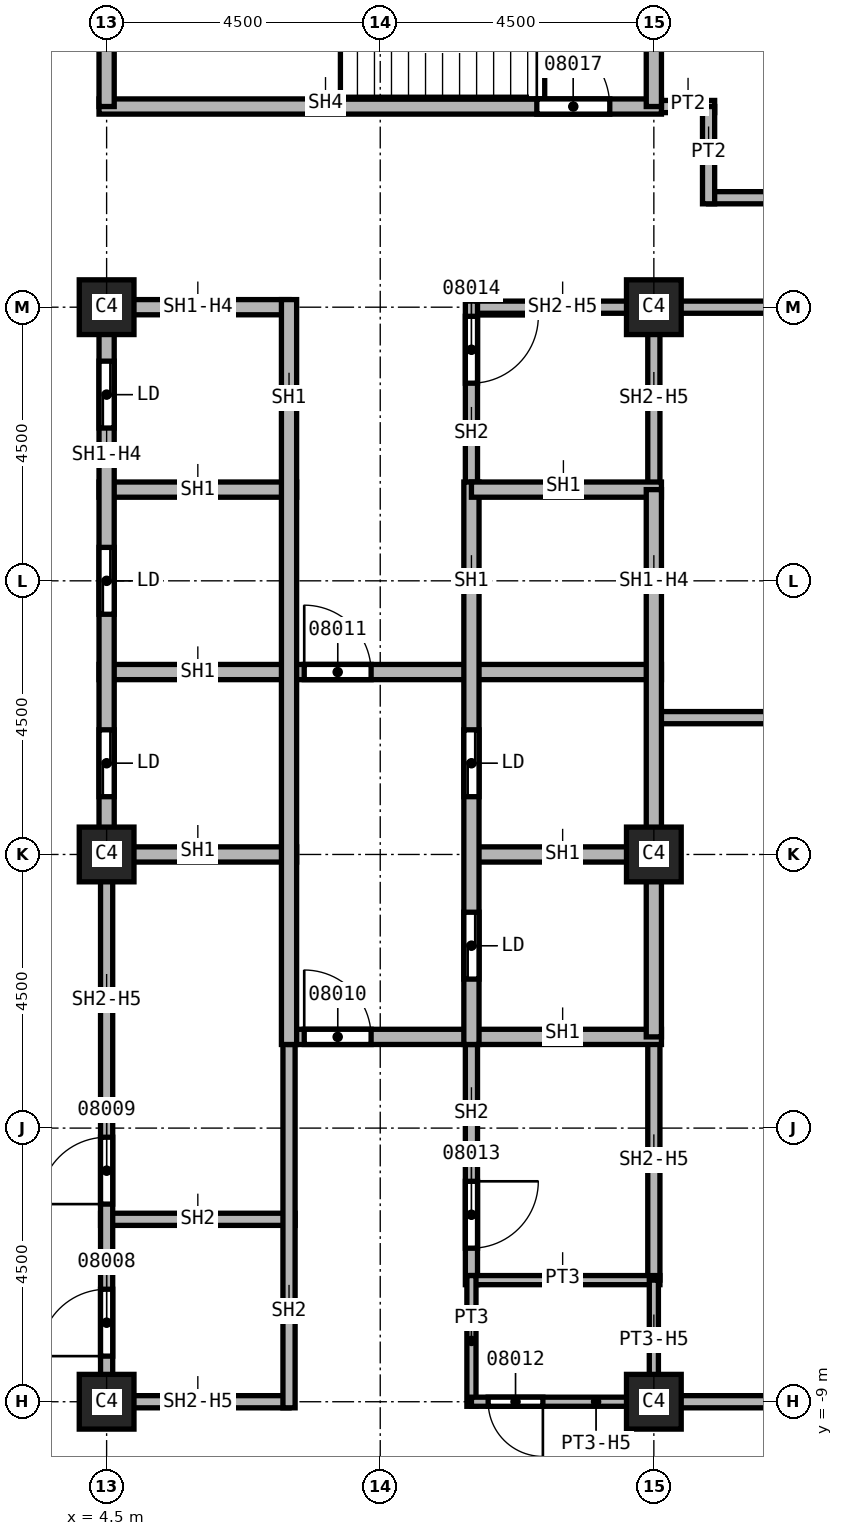
"""IFC4 building model, lengths in metres.
Left out: names, types, materials, properties, quantities, classifications, styles, units other than length and angle.
Written with IfcOpenShell. Run it as: python <this file> out.ifc"""

import sys

from ifc_helpers import new_model, si_unit, direction, frame, frame_2d, origin, origin_2d, place, context, subcontext, project, spatial, rectangle, extrude, element, fill, save


model = new_model("IFC4")
c1 = context("Model", 3, precision=1e-05, world=origin(), true_north=direction((0.0, 1.0)))
c2 = subcontext(c1, "Body", "Model", "MODEL_VIEW")
j1 = project(units=[si_unit("LENGTHUNIT", "METRE"), si_unit("PLANEANGLEUNIT", "RADIAN")], contexts=[c1])
p1 = place(None, origin())
s1 = spatial("IfcSite", under=j1, at=p1, CompositionType="ELEMENT")
p2 = place(p1, origin())
s2 = spatial("IfcBuilding", under=s1, at=p2, CompositionType="ELEMENT")
p3 = place(p2, frame((0.0, 0.0, 150.0)))
s3 = spatial("IfcBuildingStorey", under=s2, at=p3, CompositionType="ELEMENT", Elevation=150.0)
for number, where, z_axis, x_axis in (
    (1, (4.5, 0.0, 0.0), (0.0, 0.0, 1.0), (1.0, 0.0, 0.0)),
    (2, (4.5, 9.0, 0.0), (0.0, 0.0, 1.0), (1.0, 0.0, 0.0)),
    (3, (4.5, -9.0, 0.0), (0.0, 0.0, 1.0), (1.0, 0.0, 0.0)),
    (4, (13.5, 0.0, 0.0), (0.0, 0.0, 1.0), (1.0, 0.0, 0.0)),
    (5, (13.5, 9.0, 0.0), (0.0, 0.0, 1.0), (1.0, 0.0, 0.0)),
    (6, (13.5, -9.0, 0.0), (0.0, 0.0, 1.0), (1.0, 0.0, 0.0)),
):
    element("IfcColumn", number, at=place(p3, frame(where, z_axis=z_axis, x_axis=x_axis)), inside=s3, PredefinedType="COLUMN", context=c2, shape_type="SweptSolid", body=[
        extrude(rectangle(XDim=0.9, YDim=0.9, at=origin_2d()), origin(), (0.0, 0.0, 1.0), 3.7),
    ])
p4 = place(p3, frame((13.375, 12.3, 0.0), z_axis=(0.0, 0.0, 1.0), x_axis=(1.0, 0.0, 0.0)))
e7 = element("IfcWall", 7, at=p4, inside=s3, PredefinedType="PARTITIONING", context=c2, shape_type="SweptSolid", body=[
    extrude(rectangle(XDim=1.125, YDim=0.2, at=frame_2d((0.562, 0.0))), origin(), (0.0, 0.0, 1.0), 3.7),
])
for number, where, z_axis, x_axis in (
    (8, (13.5, -9.0, 0.0), (0.0, 0.0, 1.0), (1.0, 0.0, 0.0)),
    (9, (13.5, 2.25, 0.0), (0.0, 0.0, 1.0), (1.0, 0.0, 0.0)),
    (10, (18.0, 9.0, 0.0), (0.0, 0.0, 1.0), (-1.0, 0.0, 0.0)),
):
    element("IfcWall", number, at=place(p3, frame(where, z_axis=z_axis, x_axis=x_axis)), inside=s3, PredefinedType="PARTITIONING", context=c2, shape_type="SweptSolid", body=[
        extrude(rectangle(XDim=4.5, YDim=0.2, at=frame_2d((2.25, 0.0))), origin(), (0.0, 0.0, 1.0), 3.7),
    ])
p5 = place(p3, frame((14.4, 10.8, 0.0), z_axis=(0.0, 0.0, 1.0), x_axis=(1.0, 0.0, 0.0)))
e11 = element("IfcWall", 11, at=p5, inside=s3, PredefinedType="PARTITIONING", context=c2, shape_type="SweptSolid", body=[
    extrude(rectangle(XDim=3.6, YDim=0.2, at=frame_2d((1.8, 0.0))), origin(), (0.0, 0.0, 1.0), 3.7),
])
p6 = place(p3, frame((14.4, 12.3, 0.0), z_axis=(0.0, 0.0, 1.0), x_axis=(0.0, -1.0, 0.0)))
e12 = element("IfcWall", 12, at=p6, inside=s3, PredefinedType="PARTITIONING", context=c2, shape_type="SweptSolid", body=[
    extrude(rectangle(XDim=1.6, YDim=0.2, at=frame_2d((0.8, 0.0))), origin(), (0.0, 0.0, 1.0), 3.7),
])
p7 = place(p3, frame((4.4, -6.0, 0.0), z_axis=(0.0, 0.0, 1.0), x_axis=(1.0, 0.0, 0.0)))
e13 = element("IfcWall", 13, at=p7, inside=s3, PredefinedType="SOLIDWALL", context=c2, shape_type="SweptSolid", body=[
    extrude(rectangle(XDim=3.2, YDim=0.2, at=frame_2d((1.6, 0.0))), origin(), (0.0, 0.0, 1.0), 3.7),
])
p8 = place(p3, frame((4.5, -9.1, 0.0), z_axis=(0.0, 0.0, 1.0), x_axis=(0.0, 1.0, 0.0)))
e14 = element("IfcWall", 14, at=p8, inside=s3, PredefinedType="SOLIDWALL", context=c2, shape_type="SweptSolid", body=[
    extrude(rectangle(XDim=9.1, YDim=0.2, at=frame_2d((4.55, 0.0))), origin(), (0.0, 0.0, 1.0), 2.938),
])
p9 = place(p8, frame((0.85, 0.0, 0.0)))
e15 = element("IfcOpeningElement", 15, at=p9, cuts=e14, PredefinedType="OPENING", context=c2, shape_type="SweptSolid", body=[
    extrude(rectangle(XDim=1.1, YDim=2.1, at=frame_2d((0.55, 1.05))), frame((0.0, 0.1, 0.0), z_axis=(0.0, -1.0, 0.0), x_axis=(1.0, 0.0, 0.0)), (0.0, 0.0, 1.0), 0.2),
])
p10 = place(p8, frame((3.35, 0.0, 0.0)))
e16 = element("IfcOpeningElement", 16, at=p10, cuts=e14, PredefinedType="OPENING", context=c2, shape_type="SweptSolid", body=[
    extrude(rectangle(XDim=1.1, YDim=2.1, at=frame_2d((0.55, 1.05))), frame((0.0, 0.1, 0.0), z_axis=(0.0, -1.0, 0.0), x_axis=(1.0, 0.0, 0.0)), (0.0, 0.0, 1.0), 0.2),
])
p11 = place(p3, frame((7.5, -9.0, 0.0), z_axis=(0.0, 0.0, 1.0), x_axis=(-1.0, 0.0, 0.0)))
e17 = element("IfcWall", 17, at=p11, inside=s3, PredefinedType="SOLIDWALL", context=c2, shape_type="SweptSolid", body=[
    extrude(rectangle(XDim=3.0, YDim=0.2, at=frame_2d((1.5, 0.0))), origin(), (0.0, 0.0, 1.0), 2.938),
])
p12 = place(p3, frame((7.5, -2.875, 0.0), z_axis=(0.0, 0.0, 1.0), x_axis=(0.0, -1.0, 0.0)))
e18 = element("IfcWall", 18, at=p12, inside=s3, PredefinedType="SOLIDWALL", context=c2, shape_type="SweptSolid", body=[
    extrude(rectangle(XDim=6.225, YDim=0.2, at=frame_2d((3.113, 0.0))), origin(), (0.0, 0.0, 1.0), 3.7),
])
p13 = place(p3, frame((10.5, -2.875, 0.0), z_axis=(0.0, 0.0, 1.0), x_axis=(0.0, -1.0, 0.0)))
e19 = element("IfcWall", 19, at=p13, inside=s3, PredefinedType="SOLIDWALL", context=c2, shape_type="SweptSolid", body=[
    extrude(rectangle(XDim=4.2, YDim=0.2, at=frame_2d((2.1, 0.0))), origin(), (0.0, 0.0, 1.0), 3.7),
])
p14 = place(p13, frame((2.5, 0.0, 0.0)))
e20 = element("IfcOpeningElement", 20, at=p14, cuts=e19, PredefinedType="OPENING", context=c2, shape_type="SweptSolid", body=[
    extrude(rectangle(XDim=1.1, YDim=2.1, at=frame_2d((0.55, 1.05))), frame((0.0, 0.1, 0.0), z_axis=(0.0, -1.0, 0.0), x_axis=(1.0, 0.0, 0.0)), (0.0, 0.0, 1.0), 0.2),
])
p15 = place(p3, frame((10.5, 9.0, 0.0), z_axis=(0.0, 0.0, 1.0), x_axis=(1.0, 0.0, 0.0)))
e21 = element("IfcWall", 21, at=p15, inside=s3, PredefinedType="SOLIDWALL", context=c2, shape_type="SweptSolid", body=[
    extrude(rectangle(XDim=3.1, YDim=0.2, at=frame_2d((1.55, 0.0))), origin(), (0.0, 0.0, 1.0), 2.938),
])
p16 = place(p3, frame((10.5, 9.1, 0.0), z_axis=(0.0, 0.0, 1.0), x_axis=(0.0, -1.0, 0.0)))
e22 = element("IfcWall", 22, at=p16, inside=s3, PredefinedType="SOLIDWALL", context=c2, shape_type="SweptSolid", body=[
    extrude(rectangle(XDim=3.225, YDim=0.2, at=frame_2d((1.613, 0.0))), origin(), (0.0, 0.0, 1.0), 3.7),
])
p17 = place(p16, frame((0.25, 0.0, 0.0)))
e23 = element("IfcOpeningElement", 23, at=p17, cuts=e22, PredefinedType="OPENING", context=c2, shape_type="SweptSolid", body=[
    extrude(rectangle(XDim=1.1, YDim=2.1, at=frame_2d((0.55, 1.05))), frame((0.0, 0.1, 0.0), z_axis=(0.0, -1.0, 0.0), x_axis=(1.0, 0.0, 0.0)), (0.0, 0.0, 1.0), 0.2),
])
p18 = place(p3, frame((13.5, -3.0, 0.0), z_axis=(0.0, 0.0, 1.0), x_axis=(0.0, -1.0, 0.0)))
e24 = element("IfcWall", 24, at=p18, inside=s3, PredefinedType="SOLIDWALL", context=c2, shape_type="SweptSolid", body=[
    extrude(rectangle(XDim=4.0, YDim=0.2, at=frame_2d((2.0, 0.0))), origin(), (0.0, 0.0, 1.0), 2.938),
])
p19 = place(p3, frame((13.5, 9.1, 0.0), z_axis=(0.0, 0.0, 1.0), x_axis=(0.0, -1.0, 0.0)))
e25 = element("IfcWall", 25, at=p19, inside=s3, PredefinedType="SOLIDWALL", context=c2, shape_type="SweptSolid", body=[
    extrude(rectangle(XDim=3.1, YDim=0.2, at=frame_2d((1.55, 0.0))), origin(), (0.0, 0.0, 1.0), 2.938),
])
p20 = place(p3, frame((4.375, 0.0, 0.0), z_axis=(0.0, 0.0, 1.0), x_axis=(1.0, 0.0, 0.0)))
e26 = element("IfcWall", 26, at=p20, inside=s3, PredefinedType="SOLIDWALL", context=c2, shape_type="SweptSolid", body=[
    extrude(rectangle(XDim=3.25, YDim=0.25, at=frame_2d((1.625, 0.0))), origin(), (0.0, 0.0, 1.0), 3.7),
])
p21 = place(p3, frame((4.375, 3.0, 0.0), z_axis=(0.0, 0.0, 1.0), x_axis=(1.0, 0.0, 0.0)))
e27 = element("IfcWall", 27, at=p21, inside=s3, PredefinedType="SOLIDWALL", context=c2, shape_type="SweptSolid", body=[
    extrude(rectangle(XDim=9.25, YDim=0.25, at=frame_2d((4.625, 0.0))), origin(), (0.0, 0.0, 1.0), 3.7),
])
p22 = place(p21, frame((3.375, 0.0, 0.0)))
e28 = element("IfcOpeningElement", 28, at=p22, cuts=e27, PredefinedType="OPENING", context=c2, shape_type="SweptSolid", body=[
    extrude(rectangle(XDim=1.1, YDim=2.1, at=frame_2d((0.55, 1.05))), frame((0.0, 0.125, 0.0), z_axis=(0.0, -1.0, 0.0), x_axis=(1.0, 0.0, 0.0)), (0.0, 0.0, 1.0), 0.25),
])
p23 = place(p3, frame((4.375, 6.0, 0.0), z_axis=(0.0, 0.0, 1.0), x_axis=(1.0, 0.0, 0.0)))
e29 = element("IfcWall", 29, at=p23, inside=s3, PredefinedType="SOLIDWALL", context=c2, shape_type="SweptSolid", body=[
    extrude(rectangle(XDim=3.25, YDim=0.25, at=frame_2d((1.625, 0.0))), origin(), (0.0, 0.0, 1.0), 3.7),
])
p24 = place(p3, frame((4.5, 0.0, 0.0), z_axis=(0.0, 0.0, 1.0), x_axis=(0.0, 1.0, 0.0)))
e30 = element("IfcWall", 30, at=p24, inside=s3, PredefinedType="SOLIDWALL", context=c2, shape_type="SweptSolid", body=[
    extrude(rectangle(XDim=9.125, YDim=0.25, at=frame_2d((4.562, 0.0))), origin(), (0.0, 0.0, 1.0), 2.938),
])
p25 = place(p24, frame((0.95, 0.0, 0.0)))
e31 = element("IfcOpeningElement", 31, at=p25, cuts=e30, PredefinedType="OPENING", context=c2, shape_type="SweptSolid", body=[
    extrude(rectangle(XDim=1.1, YDim=2.1, at=frame_2d((0.55, 1.05))), frame((0.0, 0.125, 0.0), z_axis=(0.0, -1.0, 0.0), x_axis=(1.0, 0.0, 0.0)), (0.0, 0.0, 1.0), 0.25),
])
p26 = place(p24, frame((3.95, 0.0, 0.0)))
e32 = element("IfcOpeningElement", 32, at=p26, cuts=e30, PredefinedType="OPENING", context=c2, shape_type="SweptSolid", body=[
    extrude(rectangle(XDim=1.1, YDim=2.1, at=frame_2d((0.55, 1.05))), frame((0.0, 0.125, 0.0), z_axis=(0.0, -1.0, 0.0), x_axis=(1.0, 0.0, 0.0)), (0.0, 0.0, 1.0), 0.25),
])
p27 = place(p24, frame((7.012, 0.0, 0.0)))
e33 = element("IfcOpeningElement", 33, at=p27, cuts=e30, PredefinedType="OPENING", context=c2, shape_type="SweptSolid", body=[
    extrude(rectangle(XDim=1.1, YDim=2.1, at=frame_2d((0.55, 1.05))), frame((0.0, 0.125, 0.0), z_axis=(0.0, -1.0, 0.0), x_axis=(1.0, 0.0, 0.0)), (0.0, 0.0, 1.0), 0.25),
])
p28 = place(p3, frame((4.5, 9.0, 0.0), z_axis=(0.0, 0.0, 1.0), x_axis=(1.0, 0.0, 0.0)))
e34 = element("IfcWall", 34, at=p28, inside=s3, PredefinedType="SOLIDWALL", context=c2, shape_type="SweptSolid", body=[
    extrude(rectangle(XDim=3.0, YDim=0.25, at=frame_2d((1.5, 0.0))), origin(), (0.0, 0.0, 1.0), 2.938),
])
p29 = place(p3, frame((7.5, -3.0, 0.0), z_axis=(0.0, 0.0, 1.0), x_axis=(1.0, 0.0, 0.0)))
e35 = element("IfcWall", 35, at=p29, inside=s3, PredefinedType="SOLIDWALL", context=c2, shape_type="SweptSolid", body=[
    extrude(rectangle(XDim=6.125, YDim=0.25, at=frame_2d((3.062, 0.0))), origin(), (0.0, 0.0, 1.0), 3.7),
])
p30 = place(p29, frame((0.25, 0.0, 0.0)))
e36 = element("IfcOpeningElement", 36, at=p30, cuts=e35, PredefinedType="OPENING", context=c2, shape_type="SweptSolid", body=[
    extrude(rectangle(XDim=1.1, YDim=2.1, at=frame_2d((0.55, 1.05))), frame((0.0, 0.125, 0.0), z_axis=(0.0, -1.0, 0.0), x_axis=(1.0, 0.0, 0.0)), (0.0, 0.0, 1.0), 0.25),
])
p31 = place(p3, frame((7.5, 9.125, 0.0), z_axis=(0.0, 0.0, 1.0), x_axis=(0.0, -1.0, 0.0)))
e37 = element("IfcWall", 37, at=p31, inside=s3, PredefinedType="SOLIDWALL", context=c2, shape_type="SweptSolid", body=[
    extrude(rectangle(XDim=12.25, YDim=0.25, at=frame_2d((6.125, 0.0))), origin(), (0.0, 0.0, 1.0), 3.7),
])
p32 = place(p3, frame((10.5, 0.0, 0.0), z_axis=(0.0, 0.0, 1.0), x_axis=(1.0, 0.0, 0.0)))
e38 = element("IfcWall", 38, at=p32, inside=s3, PredefinedType="SOLIDWALL", context=c2, shape_type="SweptSolid", body=[
    extrude(rectangle(XDim=3.125, YDim=0.25, at=frame_2d((1.562, 0.0))), origin(), (0.0, 0.0, 1.0), 3.7),
])
p33 = place(p3, frame((10.5, 6.125, 0.0), z_axis=(0.0, 0.0, 1.0), x_axis=(0.0, -1.0, 0.0)))
e39 = element("IfcWall", 39, at=p33, inside=s3, PredefinedType="SOLIDWALL", context=c2, shape_type="SweptSolid", body=[
    extrude(rectangle(XDim=9.25, YDim=0.25, at=frame_2d((4.625, 0.0))), origin(), (0.0, 0.0, 1.0), 3.7),
])
p34 = place(p33, frame((7.075, 0.0, 0.0)))
e40 = element("IfcOpeningElement", 40, at=p34, cuts=e39, PredefinedType="OPENING", context=c2, shape_type="SweptSolid", body=[
    extrude(rectangle(XDim=1.1, YDim=2.1, at=frame_2d((0.55, 1.05))), frame((0.0, 0.125, 0.0), z_axis=(0.0, -1.0, 0.0), x_axis=(1.0, 0.0, 0.0)), (0.0, 0.0, 1.0), 0.25),
])
p35 = place(p33, frame((4.075, 0.0, 0.0)))
e41 = element("IfcOpeningElement", 41, at=p35, cuts=e39, PredefinedType="OPENING", context=c2, shape_type="SweptSolid", body=[
    extrude(rectangle(XDim=1.1, YDim=2.1, at=frame_2d((0.55, 1.05))), frame((0.0, 0.125, 0.0), z_axis=(0.0, -1.0, 0.0), x_axis=(1.0, 0.0, 0.0)), (0.0, 0.0, 1.0), 0.25),
])
p36 = place(p3, frame((10.5, 6.0, 0.0), z_axis=(0.0, 0.0, 1.0), x_axis=(1.0, 0.0, 0.0)))
e42 = element("IfcWall", 42, at=p36, inside=s3, PredefinedType="SOLIDWALL", context=c2, shape_type="SweptSolid", body=[
    extrude(rectangle(XDim=3.125, YDim=0.25, at=frame_2d((1.562, 0.0))), origin(), (0.0, 0.0, 1.0), 3.7),
])
p37 = place(p3, frame((13.5, 6.0, 0.0), z_axis=(0.0, 0.0, 1.0), x_axis=(0.0, -1.0, 0.0)))
e43 = element("IfcWall", 43, at=p37, inside=s3, PredefinedType="SOLIDWALL", context=c2, shape_type="SweptSolid", body=[
    extrude(rectangle(XDim=9.0, YDim=0.25, at=frame_2d((4.5, 0.0))), origin(), (0.0, 0.0, 1.0), 2.938),
])
p38 = place(p3, frame((4.375, 12.3, 0.0), z_axis=(0.0, 0.0, 1.0), x_axis=(1.0, 0.0, 0.0)))
e44 = element("IfcWall", 44, at=p38, inside=s3, PredefinedType="SOLIDWALL", context=c2, shape_type="SweptSolid", body=[
    extrude(rectangle(XDim=9.25, YDim=0.25, at=frame_2d((4.625, 0.0))), origin(), (0.0, 0.0, 1.0), 3.7),
])
p39 = place(p38, frame((7.2, 0.0, 0.0)))
e45 = element("IfcOpeningElement", 45, at=p39, cuts=e44, PredefinedType="OPENING", context=c2, shape_type="SweptSolid", body=[
    extrude(rectangle(XDim=1.2, YDim=2.1, at=frame_2d((0.6, 1.05))), frame((0.0, 0.125, 0.0), z_axis=(0.0, -1.0, 0.0), x_axis=(1.0, 0.0, 0.0)), (0.0, 0.0, 1.0), 0.25),
])
for number, where, z_axis, x_axis in (
    (46, (4.5, 12.3, 0.0), (0.0, 0.0, 1.0), (0.0, 1.0, 0.0)),
    (47, (13.5, 16.8, 0.0), (0.0, 0.0, 1.0), (0.0, -1.0, 0.0)),
):
    element("IfcWall", number, at=place(p3, frame(where, z_axis=z_axis, x_axis=x_axis)), inside=s3, PredefinedType="SOLIDWALL", context=c2, shape_type="SweptSolid", body=[
        extrude(rectangle(XDim=4.5, YDim=0.25, at=frame_2d((2.25, 0.0))), origin(), (0.0, 0.0, 1.0), 3.7),
    ])
p40 = place(p3, frame((10.5, -7.0, 0.0), z_axis=(0.0, 0.0, 1.0), x_axis=(1.0, 0.0, 0.0)))
e48 = element("IfcWall", 48, at=p40, inside=s3, PredefinedType="PARTITIONING", context=c2, shape_type="SweptSolid", body=[
    extrude(rectangle(XDim=3.1, YDim=0.15, at=frame_2d((1.55, 0.0))), origin(), (0.0, 0.0, 1.0), 3.7),
])
p41 = place(p3, frame((10.5, -6.925, 0.0), z_axis=(0.0, 0.0, 1.0), x_axis=(0.0, -1.0, 0.0)))
e49 = element("IfcWall", 49, at=p41, inside=s3, PredefinedType="PARTITIONING", context=c2, shape_type="SweptSolid", body=[
    extrude(rectangle(XDim=2.15, YDim=0.15, at=frame_2d((1.075, 0.0))), origin(), (0.0, 0.0, 1.0), 3.7),
])
p42 = place(p3, frame((13.5, -7.0, 0.0), z_axis=(0.0, 0.0, 1.0), x_axis=(0.0, -1.0, 0.0)))
e50 = element("IfcWall", 50, at=p42, inside=s3, PredefinedType="PARTITIONING", context=c2, shape_type="SweptSolid", body=[
    extrude(rectangle(XDim=2.1, YDim=0.15, at=frame_2d((1.05, 0.0))), origin(), (0.0, 0.0, 1.0), 2.938),
])
p43 = place(p3, frame((13.575, -9.0, 0.0), z_axis=(0.0, 0.0, 1.0), x_axis=(-1.0, 0.0, 0.0)))
e51 = element("IfcWall", 51, at=p43, inside=s3, PredefinedType="PARTITIONING", context=c2, shape_type="SweptSolid", body=[
    extrude(rectangle(XDim=3.075, YDim=0.15, at=frame_2d((1.538, 0.0))), origin(), (0.0, 0.0, 1.0), 2.938),
])
p44 = place(p43, frame((1.9, 0.0, 0.0)))
e52 = element("IfcOpeningElement", 52, at=p44, cuts=e51, PredefinedType="OPENING", context=c2, shape_type="SweptSolid", body=[
    extrude(rectangle(XDim=0.9, YDim=2.1, at=frame_2d((0.45, 1.05))), frame((0.0, 0.075, 0.0), z_axis=(0.0, -1.0, 0.0), x_axis=(1.0, 0.0, 0.0)), (0.0, 0.0, 1.0), 0.15),
])
p45 = place(p9, origin())
e53 = element("IfcDoor", 53, at=p45, inside=s3, OperationType="SINGLE_SWING_LEFT", PredefinedType="DOOR", context=c2, shape_type="SweptSolid", body=[
    extrude(rectangle(XDim=1.1, YDim=2.1, at=frame_2d((0.55, 1.05))), frame((0.0, 0.025, 0.0), z_axis=(0.0, -1.0, 0.0), x_axis=(1.0, 0.0, 0.0)), (0.0, 0.0, 1.0), 0.05),
])
fill(e15, e53)
p46 = place(p10, origin())
e54 = element("IfcDoor", 54, at=p46, inside=s3, OperationType="SINGLE_SWING_RIGHT", PredefinedType="DOOR", context=c2, shape_type="SweptSolid", body=[
    extrude(rectangle(XDim=1.1, YDim=2.1, at=frame_2d((0.55, 1.05))), frame((0.0, 0.025, 0.0), z_axis=(0.0, -1.0, 0.0), x_axis=(1.0, 0.0, 0.0)), (0.0, 0.0, 1.0), 0.05),
])
fill(e16, e54)
p47 = place(p30, origin())
e55 = element("IfcDoor", 55, at=p47, inside=s3, OperationType="SINGLE_SWING_LEFT", PredefinedType="DOOR", context=c2, shape_type="SweptSolid", body=[
    extrude(rectangle(XDim=1.1, YDim=2.1, at=frame_2d((0.55, 1.05))), frame((0.0, 0.025, 0.0), z_axis=(0.0, -1.0, 0.0), x_axis=(1.0, 0.0, 0.0)), (0.0, 0.0, 1.0), 0.05),
])
fill(e36, e55)
p48 = place(p22, origin())
e56 = element("IfcDoor", 56, at=p48, inside=s3, OperationType="SINGLE_SWING_RIGHT", PredefinedType="DOOR", context=c2, shape_type="SweptSolid", body=[
    extrude(rectangle(XDim=1.1, YDim=2.1, at=frame_2d((0.55, 1.05))), frame((0.0, 0.025, 0.0), z_axis=(0.0, -1.0, 0.0), x_axis=(1.0, 0.0, 0.0)), (0.0, 0.0, 1.0), 0.05),
])
fill(e28, e56)
p49 = place(p44, origin())
e57 = element("IfcDoor", 57, at=p49, inside=s3, OperationType="SINGLE_SWING_LEFT", PredefinedType="DOOR", context=c2, shape_type="SweptSolid", body=[
    extrude(rectangle(XDim=0.9, YDim=2.1, at=frame_2d((0.45, 1.05))), frame((0.0, 0.025, 0.0), z_axis=(0.0, -1.0, 0.0), x_axis=(1.0, 0.0, 0.0)), (0.0, 0.0, 1.0), 0.05),
])
fill(e52, e57)
p50 = place(p14, origin())
e58 = element("IfcDoor", 58, at=p50, inside=s3, OperationType="SINGLE_SWING_RIGHT", PredefinedType="DOOR", context=c2, shape_type="SweptSolid", body=[
    extrude(rectangle(XDim=1.1, YDim=2.1, at=frame_2d((0.55, 1.05))), frame((0.0, 0.025, 0.0), z_axis=(0.0, -1.0, 0.0), x_axis=(1.0, 0.0, 0.0)), (0.0, 0.0, 1.0), 0.05),
])
fill(e20, e58)
p51 = place(p17, origin())
e59 = element("IfcDoor", 59, at=p51, inside=s3, OperationType="SINGLE_SWING_LEFT", PredefinedType="DOOR", context=c2, shape_type="SweptSolid", body=[
    extrude(rectangle(XDim=1.1, YDim=2.1, at=frame_2d((0.55, 1.05))), frame((0.0, 0.025, 0.0), z_axis=(0.0, -1.0, 0.0), x_axis=(1.0, 0.0, 0.0)), (0.0, 0.0, 1.0), 0.05),
])
fill(e23, e59)
p52 = place(p39, origin())
e60 = element("IfcDoor", 60, at=p52, inside=s3, OperationType="SINGLE_SWING_RIGHT", PredefinedType="DOOR", context=c2, shape_type="SweptSolid", body=[
    extrude(rectangle(XDim=1.2, YDim=2.1, at=frame_2d((0.6, 1.05))), frame((0.0, 0.025, 0.0), z_axis=(0.0, -1.0, 0.0), x_axis=(1.0, 0.0, 0.0)), (0.0, 0.0, 1.0), 0.05),
])
fill(e45, e60)
p53 = place(p25, origin())
e61 = element("IfcDoor", 61, at=p53, inside=s3, OperationType="SLIDING_TO_LEFT", PredefinedType="DOOR", context=c2, shape_type="SweptSolid", body=[
    extrude(rectangle(XDim=1.1, YDim=2.1, at=frame_2d((0.55, 1.05))), frame((0.0, 0.025, 0.0), z_axis=(0.0, -1.0, 0.0), x_axis=(1.0, 0.0, 0.0)), (0.0, 0.0, 1.0), 0.05),
])
fill(e31, e61)
p54 = place(p26, origin())
e62 = element("IfcDoor", 62, at=p54, inside=s3, OperationType="SLIDING_TO_LEFT", PredefinedType="DOOR", context=c2, shape_type="SweptSolid", body=[
    extrude(rectangle(XDim=1.1, YDim=2.1, at=frame_2d((0.55, 1.05))), frame((0.0, 0.025, 0.0), z_axis=(0.0, -1.0, 0.0), x_axis=(1.0, 0.0, 0.0)), (0.0, 0.0, 1.0), 0.05),
])
fill(e32, e62)
p55 = place(p27, origin())
e63 = element("IfcDoor", 63, at=p55, inside=s3, OperationType="SLIDING_TO_LEFT", PredefinedType="DOOR", context=c2, shape_type="SweptSolid", body=[
    extrude(rectangle(XDim=1.1, YDim=2.1, at=frame_2d((0.55, 1.05))), frame((0.0, 0.025, 0.0), z_axis=(0.0, -1.0, 0.0), x_axis=(1.0, 0.0, 0.0)), (0.0, 0.0, 1.0), 0.05),
])
fill(e33, e63)
p56 = place(p34, origin())
e64 = element("IfcDoor", 64, at=p56, inside=s3, OperationType="SLIDING_TO_LEFT", PredefinedType="DOOR", context=c2, shape_type="SweptSolid", body=[
    extrude(rectangle(XDim=1.1, YDim=2.1, at=frame_2d((0.55, 1.05))), frame((0.0, 0.025, 0.0), z_axis=(0.0, -1.0, 0.0), x_axis=(1.0, 0.0, 0.0)), (0.0, 0.0, 1.0), 0.05),
])
fill(e40, e64)
p57 = place(p35, origin())
e65 = element("IfcDoor", 65, at=p57, inside=s3, OperationType="SLIDING_TO_LEFT", PredefinedType="DOOR", context=c2, shape_type="SweptSolid", body=[
    extrude(rectangle(XDim=1.1, YDim=2.1, at=frame_2d((0.55, 1.05))), frame((0.0, 0.025, 0.0), z_axis=(0.0, -1.0, 0.0), x_axis=(1.0, 0.0, 0.0)), (0.0, 0.0, 1.0), 0.05),
])
fill(e41, e65)
save(model, sys.argv[1])
